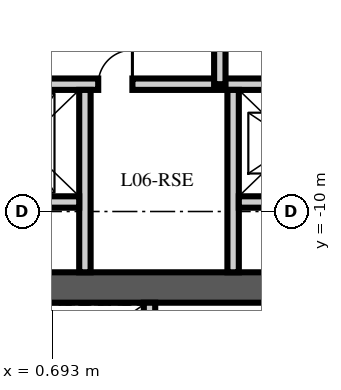
"""IFC4 building model, lengths in metres.
Left out: names, types, materials, properties, quantities, classifications, styles, units other than length and angle.
Written with IfcOpenShell. Run it as: python <this file> out.ifc"""

import sys

from ifc_helpers import new_model, si_unit, direction, frame, frame_2d, origin, place, context, subcontext, project, spatial, rectangle, extrude, element, fill, save


model = new_model("IFC4")
c1 = context("Model", 3, precision=1e-05, world=origin(), true_north=direction((0.0, 1.0)))
c2 = subcontext(c1, "Body", "Model", "MODEL_VIEW")
j1 = project(units=[si_unit("LENGTHUNIT", "METRE"), si_unit("PLANEANGLEUNIT", "RADIAN")], contexts=[c1])
p1 = place(None, origin())
s1 = spatial("IfcSite", under=j1, at=p1, CompositionType="ELEMENT")
p2 = place(p1, origin())
s2 = spatial("IfcBuilding", under=s1, at=p2, CompositionType="ELEMENT")
p3 = place(p2, frame((0.0, 0.0, 28.5)))
s3 = spatial("IfcBuildingStorey", under=s2, at=p3, CompositionType="ELEMENT", Elevation=28.5)
p4 = place(p3, frame((-15.5, -12.0, -0.25), z_axis=(0.0, 0.0, 1.0), x_axis=(1.0, 0.0, 0.0)))
e1 = element("IfcWall", 1, at=p4, inside=s3, PredefinedType="SHEAR", context=c2, shape_type="SweptSolid", body=[
    extrude(rectangle(XDim=31.0, YDim=0.8, at=frame_2d((15.5, 0.0))), origin(), (0.0, 0.0, 1.0), 3.75),
])
p5 = place(p3, frame((-8.5, -6.65, 0.0), z_axis=(0.0, 0.0, 1.0), x_axis=(1.0, 0.0, 0.0)))
e2 = element("IfcWall", 2, at=p5, inside=s3, PredefinedType="PARTITIONING", context=c2, shape_type="SweptSolid", body=[
    extrude(rectangle(XDim=17.0, YDim=0.3, at=frame_2d((8.5, 0.0))), origin(), (0.0, 0.0, 1.0), 3.5),
])
p6 = place(p5, frame((7.8, 0.0, 0.0)))
e3 = element("IfcOpeningElement", 3, at=p6, cuts=e2, PredefinedType="OPENING", context=c2, shape_type="SweptSolid", body=[
    extrude(rectangle(XDim=1.3, YDim=2.4, at=frame_2d((0.65, 1.2))), frame((0.0, 0.16, 0.0), z_axis=(0.0, -1.0, 0.0), x_axis=(1.0, 0.0, 0.0)), (0.0, 0.0, 1.0), 0.32),
])
p7 = place(p5, frame((5.65, 0.0, 0.0)))
e4 = element("IfcOpeningElement", 4, at=p7, cuts=e2, PredefinedType="OPENING", context=c2, shape_type="SweptSolid", body=[
    extrude(rectangle(XDim=0.9, YDim=2.1, at=frame_2d((0.45, 1.05))), frame((0.0, 0.16, 0.0), z_axis=(0.0, -1.0, 0.0), x_axis=(1.0, 0.0, 0.0)), (0.0, 0.0, 1.0), 0.32),
])
p8 = place(p5, frame((10.4, 0.0, 0.0)))
e5 = element("IfcOpeningElement", 5, at=p8, cuts=e2, PredefinedType="OPENING", context=c2, shape_type="SweptSolid", body=[
    extrude(rectangle(XDim=0.9, YDim=2.1, at=frame_2d((0.45, 1.05))), frame((0.0, 0.16, 0.0), z_axis=(0.0, -1.0, 0.0), x_axis=(1.0, 0.0, 0.0)), (0.0, 0.0, 1.0), 0.32),
])
for number, where, z_axis, x_axis in (
    (6, (1.55, -11.6, 0.0), (0.0, 0.0, 1.0), (0.0, 1.0, 0.0)),
    (7, (5.45, -11.6, 0.0), (0.0, 0.0, 1.0), (0.0, 1.0, 0.0)),
):
    element("IfcWall", number, at=place(p3, frame(where, z_axis=z_axis, x_axis=x_axis)), inside=s3, PredefinedType="PARTITIONING", context=c2, shape_type="SweptSolid", body=[
        extrude(rectangle(XDim=4.8, YDim=0.3, at=frame_2d((2.4, 0.0))), origin(), (0.0, 0.0, 1.0), 3.5),
    ])
for number, where, z_axis, x_axis in (
    (8, (-1.5, -9.75, 0.0), (0.0, 0.0, 1.0), (1.0, 0.0, 0.0)),
    (9, (5.6, -9.75, 0.0), (0.0, 0.0, 1.0), (1.0, 0.0, 0.0)),
):
    element("IfcWall", number, at=place(p3, frame(where, z_axis=z_axis, x_axis=x_axis)), inside=s3, PredefinedType="PARTITIONING", context=c2, shape_type="SweptSolid", body=[
        extrude(rectangle(XDim=2.9, YDim=0.3, at=frame_2d((1.45, 0.0))), origin(), (0.0, 0.0, 1.0), 3.5),
    ])
p9 = place(p3, frame((3.25, -14.5, 0.0), z_axis=(0.0, 0.0, 1.0), x_axis=(0.0, 1.0, 0.0)))
e10 = element("IfcWall", 10, at=p9, inside=s3, PredefinedType="PARTITIONING", context=c2, shape_type="SweptSolid", body=[
    extrude(rectangle(XDim=2.1, YDim=0.3, at=frame_2d((1.05, 0.0))), origin(), (0.0, 0.0, 1.0), 3.5),
])
p10 = place(p3, frame((5.1, -6.65, 0.0), z_axis=(0.0, 0.0, 1.0), x_axis=(0.0, 1.0, 0.0)))
e11 = element("IfcWall", 11, at=p10, inside=s3, PredefinedType="PARTITIONING", context=c2, shape_type="SweptSolid", body=[
    extrude(rectangle(XDim=9.45, YDim=0.3, at=frame_2d((4.725, 0.0))), origin(), (0.0, 0.0, 1.0), 3.5),
])
p11 = place(p10, frame((4.275, 0.0, 0.0)))
e12 = element("IfcOpeningElement", 12, at=p11, cuts=e11, PredefinedType="OPENING", context=c2, shape_type="SweptSolid", body=[
    extrude(rectangle(XDim=0.9, YDim=2.1, at=frame_2d((0.45, 1.05))), frame((0.0, 0.16, 0.0), z_axis=(0.0, -1.0, 0.0), x_axis=(1.0, 0.0, 0.0)), (0.0, 0.0, 1.0), 0.32),
])
p12 = place(p8, origin())
e13 = element("IfcDoor", 13, at=p12, inside=s3, OperationType="SINGLE_SWING_RIGHT", PredefinedType="DOOR", context=c2, shape_type="SweptSolid", body=[
    extrude(rectangle(XDim=0.9, YDim=2.1, at=frame_2d((0.45, 1.05))), frame((0.0, 0.025, 0.0), z_axis=(0.0, -1.0, 0.0), x_axis=(1.0, 0.0, 0.0)), (0.0, 0.0, 1.0), 0.05),
])
fill(e5, e13)
save(model, sys.argv[1])
